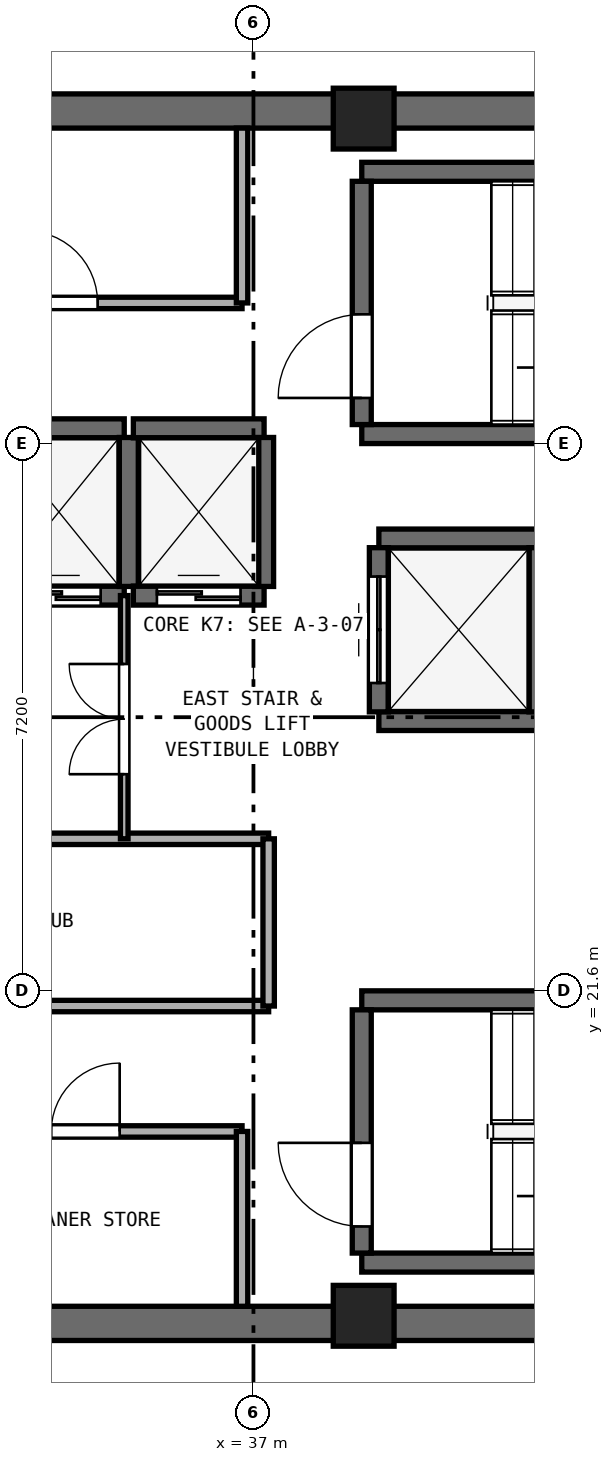
"""IFC4 building model, lengths in metres.
Left out: names, types, materials, properties, quantities, classifications, styles, units other than length and angle.
Written with IfcOpenShell. Run it as: python <this file> out.ifc"""

import sys

from ifc_helpers import new_model, si_unit, direction, frame, frame_2d, origin, origin_2d, place, context, subcontext, project, spatial, rectangle, extrude, element, fill, save


model = new_model("IFC4")
c1 = context("Model", 3, precision=1e-05, world=origin(), true_north=direction((0.0, 1.0)))
c2 = subcontext(c1, "Body", "Model", "MODEL_VIEW")
j1 = project(units=[si_unit("LENGTHUNIT", "METRE"), si_unit("PLANEANGLEUNIT", "RADIAN")], contexts=[c1])
p1 = place(None, origin())
s1 = spatial("IfcSite", under=j1, at=p1, CompositionType="ELEMENT")
p2 = place(p1, origin())
s2 = spatial("IfcBuilding", under=s1, at=p2, CompositionType="ELEMENT")
p3 = place(p2, frame((0.0, 0.0, 282.0)))
s3 = spatial("IfcBuildingStorey", under=s2, at=p3, CompositionType="ELEMENT", Elevation=282.0)
for number, where, z_axis, x_axis in (
    (1, (25.4, 17.225, 0.0), (0.0, 0.0, 1.0), (1.0, 0.0, 0.0)),
    (2, (25.4, 33.175, 0.0), (0.0, 0.0, 1.0), (1.0, 0.0, 0.0)),
):
    element("IfcWall", number, at=place(p3, frame(where, z_axis=z_axis, x_axis=x_axis)), inside=s3, PredefinedType="SHEAR", context=c2, shape_type="SweptSolid", body=[
        extrude(rectangle(XDim=23.2, YDim=0.45, at=frame_2d((11.6, 0.0))), origin(), (0.0, 0.0, 1.0), 3.54),
    ])
for number, where, z_axis, x_axis in (
    (3, (38.45, 17.325, 0.0), (0.0, 0.0, 1.0), (1.0, 0.0, 0.0)),
    (4, (38.45, 33.075, 0.0), (0.0, 0.0, 1.0), (1.0, 0.0, 0.0)),
):
    element("IfcColumn", number, at=place(p3, frame(where, z_axis=z_axis, x_axis=x_axis)), inside=s3, PredefinedType="PILASTER", context=c2, shape_type="SweptSolid", body=[
        extrude(rectangle(XDim=0.8, YDim=0.8, at=origin_2d()), origin(), (0.0, 0.0, 1.0), 3.8),
    ])
for number, where, z_axis, x_axis in (
    (5, (38.425, 28.925, 0.0), (0.0, 0.0, 1.0), (1.0, 0.0, 0.0)),
    (6, (38.425, 32.375, 0.0), (0.0, 0.0, 1.0), (1.0, 0.0, 0.0)),
):
    element("IfcWall", number, at=place(p3, frame(where, z_axis=z_axis, x_axis=x_axis)), inside=s3, PredefinedType="SHEAR", context=c2, shape_type="SweptSolid", body=[
        extrude(rectangle(XDim=7.3, YDim=0.25, at=frame_2d((3.65, 0.0))), origin(), (0.0, 0.0, 1.0), 3.54),
    ])
p4 = place(p3, frame((38.425, 29.05, 0.0), z_axis=(0.0, 0.0, 1.0), x_axis=(0.0, 1.0, 0.0)))
e7 = element("IfcWall", 7, at=p4, inside=s3, PredefinedType="SHEAR", context=c2, shape_type="SweptSolid", body=[
    extrude(rectangle(XDim=3.2, YDim=0.25, at=frame_2d((1.6, 0.0))), origin(), (0.0, 0.0, 1.0), 3.54),
])
p5 = place(p4, frame((0.35, 0.0, 0.0)))
e8 = element("IfcOpeningElement", 8, at=p5, cuts=e7, PredefinedType="OPENING", context=c2, shape_type="SweptSolid", body=[
    extrude(rectangle(XDim=1.1, YDim=2.15, at=frame_2d((0.55, 1.075))), frame((0.0, 0.135, 0.0), z_axis=(0.0, -1.0, 0.0), x_axis=(1.0, 0.0, 0.0)), (0.0, 0.0, 1.0), 0.27),
])
for number, where, z_axis, x_axis in (
    (9, (38.425, 18.025, 0.0), (0.0, 0.0, 1.0), (1.0, 0.0, 0.0)),
    (10, (38.425, 21.475, 0.0), (0.0, 0.0, 1.0), (1.0, 0.0, 0.0)),
):
    element("IfcWall", number, at=place(p3, frame(where, z_axis=z_axis, x_axis=x_axis)), inside=s3, PredefinedType="SHEAR", context=c2, shape_type="SweptSolid", body=[
        extrude(rectangle(XDim=7.3, YDim=0.25, at=frame_2d((3.65, 0.0))), origin(), (0.0, 0.0, 1.0), 3.54),
    ])
p6 = place(p3, frame((38.425, 18.15, 0.0), z_axis=(0.0, 0.0, 1.0), x_axis=(0.0, 1.0, 0.0)))
e11 = element("IfcWall", 11, at=p6, inside=s3, PredefinedType="SHEAR", context=c2, shape_type="SweptSolid", body=[
    extrude(rectangle(XDim=3.2, YDim=0.25, at=frame_2d((1.6, 0.0))), origin(), (0.0, 0.0, 1.0), 3.54),
])
p7 = place(p6, frame((0.35, 0.0, 0.0)))
e12 = element("IfcOpeningElement", 12, at=p7, cuts=e11, PredefinedType="OPENING", context=c2, shape_type="SweptSolid", body=[
    extrude(rectangle(XDim=1.1, YDim=2.15, at=frame_2d((0.55, 1.075))), frame((0.0, 0.135, 0.0), z_axis=(0.0, -1.0, 0.0), x_axis=(1.0, 0.0, 0.0)), (0.0, 0.0, 1.0), 0.27),
])
p8 = place(p3, frame((33.58, 26.8, 0.0), z_axis=(0.0, 0.0, 1.0), x_axis=(1.0, 0.0, 0.0)))
e13 = element("IfcWall", 13, at=p8, inside=s3, PredefinedType="SHEAR", context=c2, shape_type="SweptSolid", body=[
    extrude(rectangle(XDim=1.72, YDim=0.25, at=frame_2d((0.86, 0.0))), origin(), (0.0, 0.0, 1.0), 3.54),
])
p9 = place(p8, frame((0.31, 0.0, 0.0)))
e14 = element("IfcOpeningElement", 14, at=p9, cuts=e13, PredefinedType="OPENING", context=c2, shape_type="SweptSolid", body=[
    extrude(rectangle(XDim=1.1, YDim=2.15, at=frame_2d((0.55, 1.075))), frame((0.0, 0.135, 0.0), z_axis=(0.0, -1.0, 0.0), x_axis=(1.0, 0.0, 0.0)), (0.0, 0.0, 1.0), 0.27),
])
p10 = place(p3, frame((33.58, 29.0, 0.0), z_axis=(0.0, 0.0, 1.0), x_axis=(1.0, 0.0, 0.0)))
e15 = element("IfcWall", 15, at=p10, inside=s3, PredefinedType="SHEAR", context=c2, shape_type="SweptSolid", body=[
    extrude(rectangle(XDim=1.72, YDim=0.25, at=frame_2d((0.86, 0.0))), origin(), (0.0, 0.0, 1.0), 3.54),
])
p11 = place(p3, frame((35.36, 26.92, 0.0), z_axis=(0.0, 0.0, 1.0), x_axis=(0.0, 1.0, 0.0)))
e16 = element("IfcWall", 16, at=p11, inside=s3, PredefinedType="SHEAR", context=c2, shape_type="SweptSolid", body=[
    extrude(rectangle(XDim=1.96, YDim=0.25, at=frame_2d((0.98, 0.0))), origin(), (0.0, 0.0, 1.0), 3.54),
])
p12 = place(p3, frame((35.42, 26.8, 0.0), z_axis=(0.0, 0.0, 1.0), x_axis=(1.0, 0.0, 0.0)))
e17 = element("IfcWall", 17, at=p12, inside=s3, PredefinedType="SHEAR", context=c2, shape_type="SweptSolid", body=[
    extrude(rectangle(XDim=1.72, YDim=0.25, at=frame_2d((0.86, 0.0))), origin(), (0.0, 0.0, 1.0), 3.54),
])
p13 = place(p12, frame((0.31, 0.0, 0.0)))
e18 = element("IfcOpeningElement", 18, at=p13, cuts=e17, PredefinedType="OPENING", context=c2, shape_type="SweptSolid", body=[
    extrude(rectangle(XDim=1.1, YDim=2.15, at=frame_2d((0.55, 1.075))), frame((0.0, 0.135, 0.0), z_axis=(0.0, -1.0, 0.0), x_axis=(1.0, 0.0, 0.0)), (0.0, 0.0, 1.0), 0.27),
])
p14 = place(p3, frame((35.42, 29.0, 0.0), z_axis=(0.0, 0.0, 1.0), x_axis=(1.0, 0.0, 0.0)))
e19 = element("IfcWall", 19, at=p14, inside=s3, PredefinedType="SHEAR", context=c2, shape_type="SweptSolid", body=[
    extrude(rectangle(XDim=1.72, YDim=0.25, at=frame_2d((0.86, 0.0))), origin(), (0.0, 0.0, 1.0), 3.54),
])
p15 = place(p3, frame((37.14, 26.92, 0.0), z_axis=(0.0, 0.0, 1.0), x_axis=(0.0, 1.0, 0.0)))
e20 = element("IfcWall", 20, at=p15, inside=s3, PredefinedType="SHEAR", context=c2, shape_type="SweptSolid", body=[
    extrude(rectangle(XDim=1.96, YDim=0.25, at=frame_2d((0.98, 0.0))), origin(), (0.0, 0.0, 1.0), 3.54),
])
for number, where, z_axis, x_axis in (
    (21, (38.65, 25.15, 0.0), (0.0, 0.0, 1.0), (1.0, 0.0, 0.0)),
    (22, (38.65, 27.55, 0.0), (0.0, 0.0, 1.0), (1.0, 0.0, 0.0)),
):
    element("IfcWall", number, at=place(p3, frame(where, z_axis=z_axis, x_axis=x_axis)), inside=s3, PredefinedType="SHEAR", context=c2, shape_type="SweptSolid", body=[
        extrude(rectangle(XDim=2.1, YDim=0.25, at=frame_2d((1.05, 0.0))), origin(), (0.0, 0.0, 1.0), 3.54),
    ])
p16 = place(p3, frame((38.65, 25.27, 0.0), z_axis=(0.0, 0.0, 1.0), x_axis=(0.0, 1.0, 0.0)))
e23 = element("IfcWall", 23, at=p16, inside=s3, PredefinedType="SHEAR", context=c2, shape_type="SweptSolid", body=[
    extrude(rectangle(XDim=2.16, YDim=0.25, at=frame_2d((1.08, 0.0))), origin(), (0.0, 0.0, 1.0), 3.54),
])
p17 = place(p16, frame((0.38, 0.0, 0.0)))
e24 = element("IfcOpeningElement", 24, at=p17, cuts=e23, PredefinedType="OPENING", context=c2, shape_type="SweptSolid", body=[
    extrude(rectangle(XDim=1.4, YDim=2.2, at=frame_2d((0.7, 1.1))), frame((0.0, 0.135, 0.0), z_axis=(0.0, -1.0, 0.0), x_axis=(1.0, 0.0, 0.0)), (0.0, 0.0, 1.0), 0.27),
])
p18 = place(p3, frame((40.75, 25.27, 0.0), z_axis=(0.0, 0.0, 1.0), x_axis=(0.0, 1.0, 0.0)))
e25 = element("IfcWall", 25, at=p18, inside=s3, PredefinedType="SHEAR", context=c2, shape_type="SweptSolid", body=[
    extrude(rectangle(XDim=2.16, YDim=0.25, at=frame_2d((1.08, 0.0))), origin(), (0.0, 0.0, 1.0), 3.54),
])
p19 = place(p3, frame((32.1, 30.65, 0.0), z_axis=(0.0, 0.0, 1.0), x_axis=(1.0, 0.0, 0.0)))
e26 = element("IfcWall", 26, at=p19, inside=s3, PredefinedType="PARTITIONING", context=c2, shape_type="SweptSolid", body=[
    extrude(rectangle(XDim=4.75, YDim=0.15, at=frame_2d((2.375, 0.0))), origin(), (0.0, 0.0, 1.0), 3.54),
])
p20 = place(p19, frame((1.9, 0.0, 0.0)))
e27 = element("IfcOpeningElement", 27, at=p20, cuts=e26, PredefinedType="OPENING", context=c2, shape_type="SweptSolid", body=[
    extrude(rectangle(XDim=0.95, YDim=2.1, at=frame_2d((0.475, 1.05))), frame((0.0, 0.085, 0.0), z_axis=(0.0, -1.0, 0.0), x_axis=(1.0, 0.0, 0.0)), (0.0, 0.0, 1.0), 0.17),
])
p21 = place(p3, frame((36.85, 30.65, 0.0), z_axis=(0.0, 0.0, 1.0), x_axis=(0.0, 1.0, 0.0)))
e28 = element("IfcWall", 28, at=p21, inside=s3, PredefinedType="PARTITIONING", context=c2, shape_type="SweptSolid", body=[
    extrude(rectangle(XDim=2.3, YDim=0.15, at=frame_2d((1.15, 0.0))), origin(), (0.0, 0.0, 1.0), 3.54),
])
p22 = place(p3, frame((32.73, 19.75, 0.0), z_axis=(0.0, 0.0, 1.0), x_axis=(1.0, 0.0, 0.0)))
e29 = element("IfcWall", 29, at=p22, inside=s3, PredefinedType="PARTITIONING", context=c2, shape_type="SweptSolid", body=[
    extrude(rectangle(XDim=4.12, YDim=0.15, at=frame_2d((2.06, 0.0))), origin(), (0.0, 0.0, 1.0), 3.54),
])
p23 = place(p22, frame((1.61, 0.0, 0.0)))
e30 = element("IfcOpeningElement", 30, at=p23, cuts=e29, PredefinedType="OPENING", context=c2, shape_type="SweptSolid", body=[
    extrude(rectangle(XDim=0.9, YDim=2.1, at=frame_2d((0.45, 1.05))), frame((0.0, 0.085, 0.0), z_axis=(0.0, -1.0, 0.0), x_axis=(1.0, 0.0, 0.0)), (0.0, 0.0, 1.0), 0.17),
])
p24 = place(p3, frame((36.85, 17.45, 0.0), z_axis=(0.0, 0.0, 1.0), x_axis=(0.0, 1.0, 0.0)))
e31 = element("IfcWall", 31, at=p24, inside=s3, PredefinedType="PARTITIONING", context=c2, shape_type="SweptSolid", body=[
    extrude(rectangle(XDim=2.3, YDim=0.15, at=frame_2d((1.15, 0.0))), origin(), (0.0, 0.0, 1.0), 3.54),
])
p25 = place(p3, frame((30.08, 21.4, 0.0), z_axis=(0.0, 0.0, 1.0), x_axis=(1.0, 0.0, 0.0)))
e32 = element("IfcWall", 32, at=p25, inside=s3, PredefinedType="PARTITIONING", context=c2, shape_type="SweptSolid", body=[
    extrude(rectangle(XDim=7.12, YDim=0.15, at=frame_2d((3.56, 0.0))), origin(), (0.0, 0.0, 1.0), 3.54),
])
p26 = place(p3, frame((30.08, 23.6, 0.0), z_axis=(0.0, 0.0, 1.0), x_axis=(1.0, 0.0, 0.0)))
e33 = element("IfcWall", 33, at=p26, inside=s3, PredefinedType="PARTITIONING", context=c2, shape_type="SweptSolid", body=[
    extrude(rectangle(XDim=7.12, YDim=0.15, at=frame_2d((3.56, 0.0))), origin(), (0.0, 0.0, 1.0), 3.54),
])
p27 = place(p26, frame((3.11, 0.0, 0.0)))
e34 = element("IfcOpeningElement", 34, at=p27, cuts=e33, PredefinedType="OPENING", context=c2, shape_type="SweptSolid", body=[
    extrude(rectangle(XDim=0.9, YDim=2.1, at=frame_2d((0.45, 1.05))), frame((0.0, 0.085, 0.0), z_axis=(0.0, -1.0, 0.0), x_axis=(1.0, 0.0, 0.0)), (0.0, 0.0, 1.0), 0.17),
])
p28 = place(p3, frame((37.2, 21.4, 0.0), z_axis=(0.0, 0.0, 1.0), x_axis=(0.0, 1.0, 0.0)))
e35 = element("IfcWall", 35, at=p28, inside=s3, PredefinedType="PARTITIONING", context=c2, shape_type="SweptSolid", body=[
    extrude(rectangle(XDim=2.2, YDim=0.15, at=frame_2d((1.1, 0.0))), origin(), (0.0, 0.0, 1.0), 3.54),
])
p29 = place(p3, frame((35.3, 23.6, 0.0), z_axis=(0.0, 0.0, 1.0), x_axis=(0.0, 1.0, 0.0)))
e36 = element("IfcWall", 36, at=p29, inside=s3, PredefinedType="PARTITIONING", context=c2, shape_type="SweptSolid", body=[
    extrude(rectangle(XDim=3.2, YDim=0.1, at=frame_2d((1.6, 0.0))), origin(), (0.0, 0.0, 1.0), 3.54),
])
p30 = place(p29, frame((0.85, 0.0, 0.0)))
e37 = element("IfcOpeningElement", 37, at=p30, cuts=e36, PredefinedType="OPENING", context=c2, shape_type="SweptSolid", body=[
    extrude(rectangle(XDim=1.45, YDim=2.12, at=frame_2d((0.725, 1.06))), frame((0.0, 0.06, 0.0), z_axis=(0.0, -1.0, 0.0), x_axis=(1.0, 0.0, 0.0)), (0.0, 0.0, 1.0), 0.12),
])
p31 = place(p5, origin())
e38 = element("IfcDoor", 38, at=p31, inside=s3, OperationType="SINGLE_SWING_LEFT", PredefinedType="DOOR", context=c2, shape_type="SweptSolid", body=[
    extrude(rectangle(XDim=1.1, YDim=2.15, at=frame_2d((0.55, 1.075))), frame((0.0, 0.025, 0.0), z_axis=(0.0, -1.0, 0.0), x_axis=(1.0, 0.0, 0.0)), (0.0, 0.0, 1.0), 0.05),
])
fill(e8, e38)
p32 = place(p7, origin())
e39 = element("IfcDoor", 39, at=p32, inside=s3, OperationType="SINGLE_SWING_RIGHT", PredefinedType="DOOR", context=c2, shape_type="SweptSolid", body=[
    extrude(rectangle(XDim=1.1, YDim=2.15, at=frame_2d((0.55, 1.075))), frame((0.0, 0.025, 0.0), z_axis=(0.0, -1.0, 0.0), x_axis=(1.0, 0.0, 0.0)), (0.0, 0.0, 1.0), 0.05),
])
fill(e12, e39)
p33 = place(p9, origin())
e40 = element("IfcDoor", 40, at=p33, inside=s3, OperationType="DOUBLE_DOOR_SLIDING", PredefinedType="DOOR", context=c2, shape_type="SweptSolid", body=[
    extrude(rectangle(XDim=1.1, YDim=2.15, at=frame_2d((0.55, 1.075))), frame((0.0, 0.025, 0.0), z_axis=(0.0, -1.0, 0.0), x_axis=(1.0, 0.0, 0.0)), (0.0, 0.0, 1.0), 0.05),
])
fill(e14, e40)
p34 = place(p13, origin())
e41 = element("IfcDoor", 41, at=p34, inside=s3, OperationType="DOUBLE_DOOR_SLIDING", PredefinedType="DOOR", context=c2, shape_type="SweptSolid", body=[
    extrude(rectangle(XDim=1.1, YDim=2.15, at=frame_2d((0.55, 1.075))), frame((0.0, 0.025, 0.0), z_axis=(0.0, -1.0, 0.0), x_axis=(1.0, 0.0, 0.0)), (0.0, 0.0, 1.0), 0.05),
])
fill(e18, e41)
p35 = place(p17, origin())
e42 = element("IfcDoor", 42, at=p35, inside=s3, OperationType="DOUBLE_DOOR_SLIDING", PredefinedType="DOOR", context=c2, shape_type="SweptSolid", body=[
    extrude(rectangle(XDim=1.4, YDim=2.2, at=frame_2d((0.7, 1.1))), frame((0.0, 0.025, 0.0), z_axis=(0.0, -1.0, 0.0), x_axis=(1.0, 0.0, 0.0)), (0.0, 0.0, 1.0), 0.05),
])
fill(e24, e42)
p36 = place(p20, origin())
e43 = element("IfcDoor", 43, at=p36, inside=s3, OperationType="SINGLE_SWING_LEFT", PredefinedType="DOOR", context=c2, shape_type="SweptSolid", body=[
    extrude(rectangle(XDim=0.95, YDim=2.1, at=frame_2d((0.475, 1.05))), frame((0.0, 0.025, 0.0), z_axis=(0.0, -1.0, 0.0), x_axis=(1.0, 0.0, 0.0)), (0.0, 0.0, 1.0), 0.05),
])
fill(e27, e43)
p37 = place(p23, origin())
e44 = element("IfcDoor", 44, at=p37, inside=s3, OperationType="SINGLE_SWING_RIGHT", PredefinedType="DOOR", context=c2, shape_type="SweptSolid", body=[
    extrude(rectangle(XDim=0.9, YDim=2.1, at=frame_2d((0.45, 1.05))), frame((0.0, 0.025, 0.0), z_axis=(0.0, -1.0, 0.0), x_axis=(1.0, 0.0, 0.0)), (0.0, 0.0, 1.0), 0.05),
])
fill(e30, e44)
p38 = place(p30, origin())
e45 = element("IfcDoor", 45, at=p38, inside=s3, OperationType="DOUBLE_DOOR_SINGLE_SWING", PredefinedType="DOOR", context=c2, shape_type="SweptSolid", body=[
    extrude(rectangle(XDim=1.45, YDim=2.12, at=frame_2d((0.725, 1.06))), frame((0.0, 0.025, 0.0), z_axis=(0.0, -1.0, 0.0), x_axis=(1.0, 0.0, 0.0)), (0.0, 0.0, 1.0), 0.05),
])
fill(e37, e45)
save(model, sys.argv[1])
